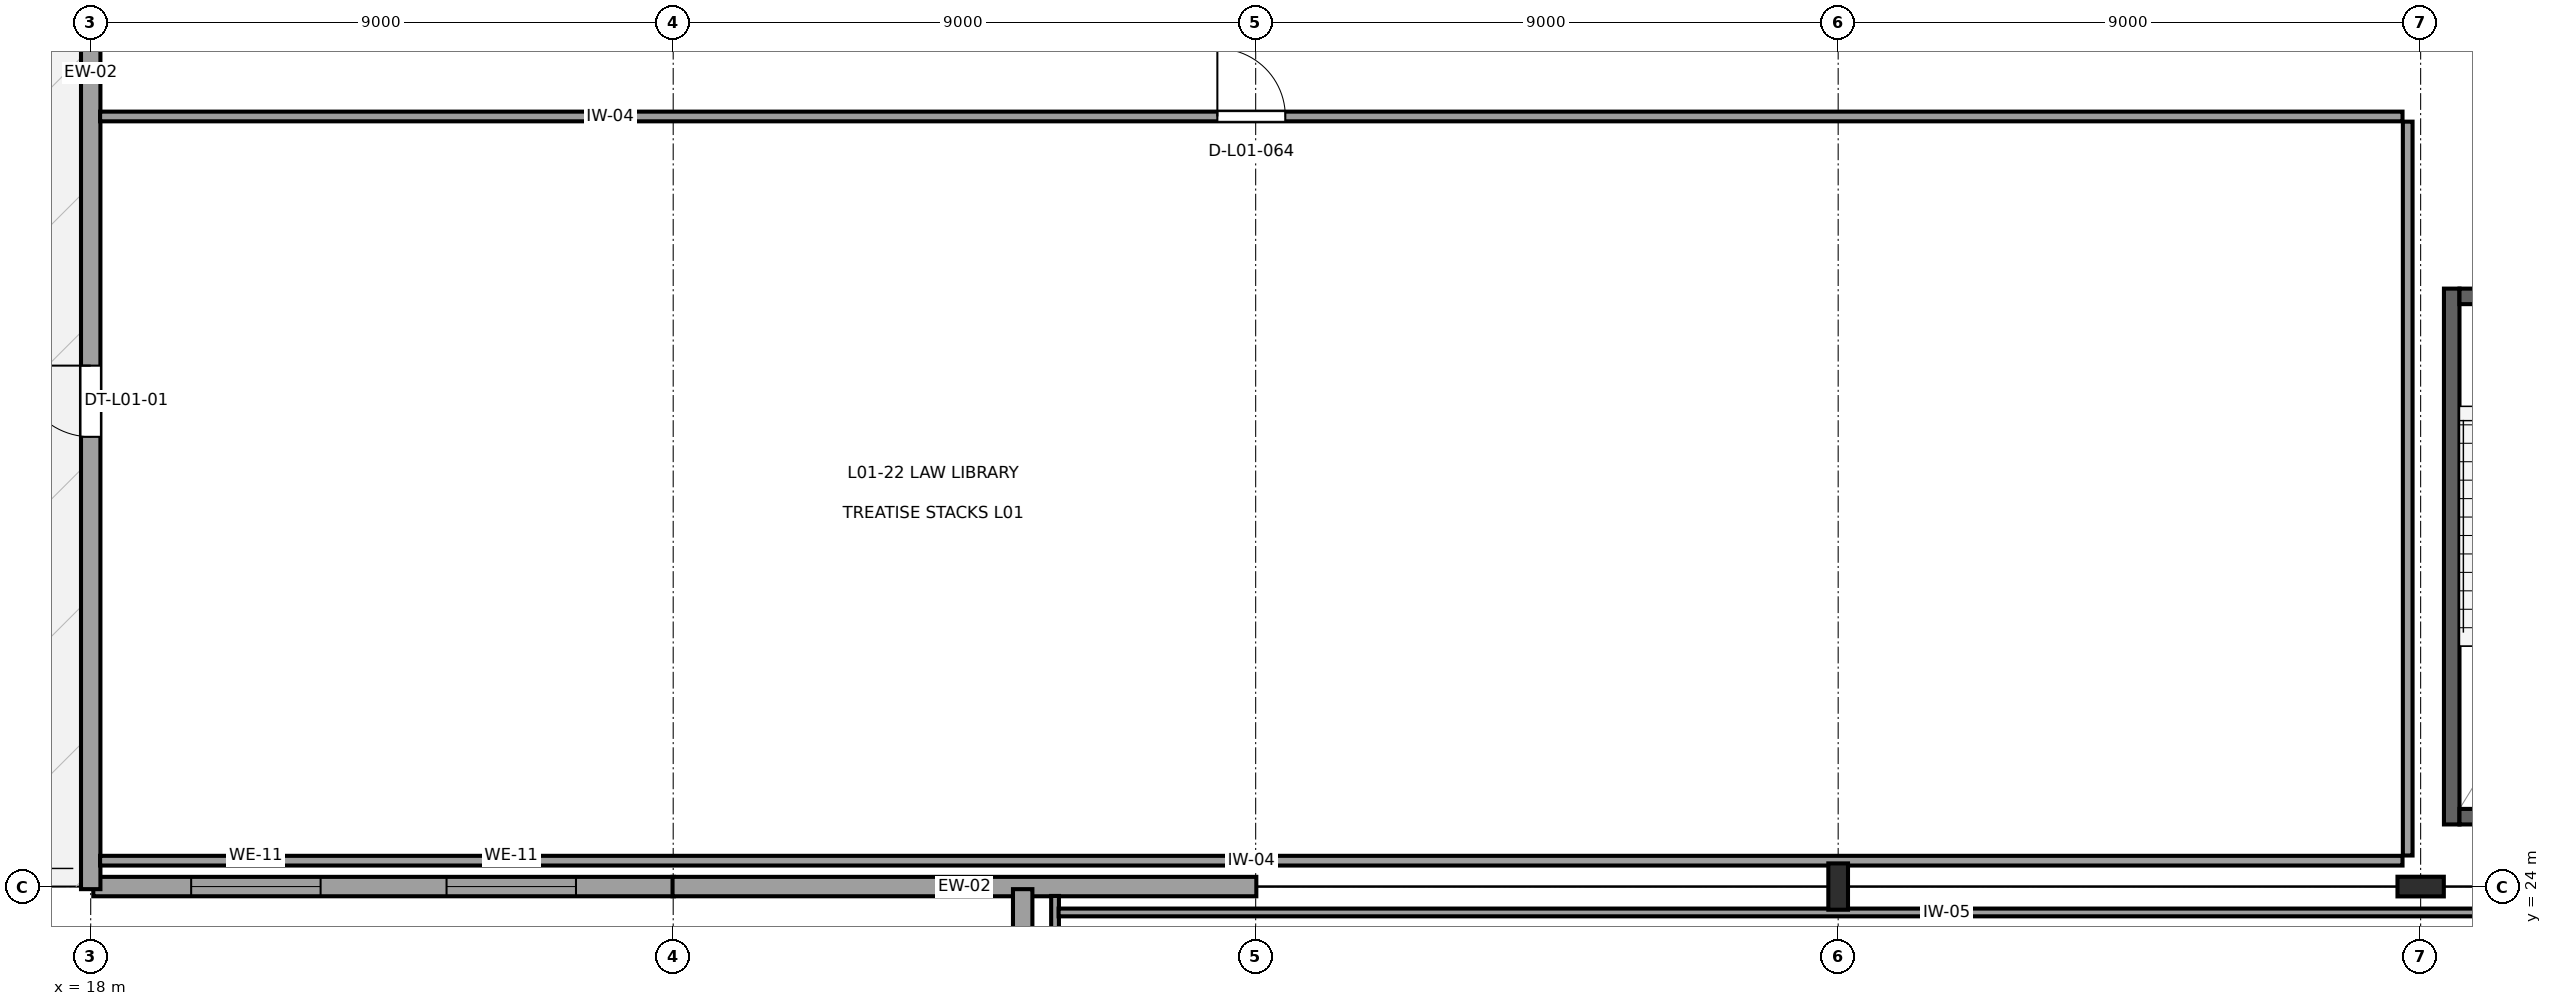
"""IFC4 building model, lengths in metres.
Left out: names, types, materials, properties, quantities, classifications, styles, units other than length and angle.
Written with IfcOpenShell. Run it as: python <this file> out.ifc"""

import sys

from ifc_helpers import new_model, si_unit, direction, frame, frame_2d, origin, origin_2d, place, context, subcontext, project, spatial, rectangle, i_section, extrude, element, fill, save


model = new_model("IFC4")
c1 = context("Model", 3, precision=1e-05, world=origin(), true_north=direction((0.0, 1.0)))
c2 = subcontext(c1, "Body", "Model", "MODEL_VIEW")
j1 = project(units=[si_unit("LENGTHUNIT", "METRE"), si_unit("PLANEANGLEUNIT", "RADIAN")], contexts=[c1])
p1 = place(None, origin())
s1 = spatial("IfcSite", under=j1, at=p1, CompositionType="ELEMENT")
p2 = place(p1, origin())
s2 = spatial("IfcBuilding", under=s1, at=p2, CompositionType="ELEMENT")
p3 = place(p2, frame((0.0, 0.0, 5.4)))
s3 = spatial("IfcBuildingStorey", under=s2, at=p3, CompositionType="ELEMENT", Elevation=5.4)
for number, where, z_axis, x_axis in (
    (1, (45.0, 24.0, 0.0), (0.0, 0.0, 1.0), (1.0, 0.0, 0.0)),
    (2, (54.0, 24.0, 0.0), (0.0, 0.0, 1.0), (0.0, 1.0, 0.0)),
):
    element("IfcColumn", number, at=place(p3, frame(where, z_axis=z_axis, x_axis=x_axis)), inside=s3, PredefinedType="COLUMN", context=c2, shape_type="SweptSolid", body=[
        extrude(i_section(OverallWidth=0.304, OverallDepth=0.716, WebThickness=0.021, FlangeThickness=0.04, at=origin_2d()), origin(), (0.0, 0.0, 1.0), 4.5),
    ])
p4 = place(p3, frame((18.04, 24.0, 0.0), z_axis=(0.0, 0.0, 1.0), x_axis=(1.0, 0.0, 0.0)))
e3 = element("IfcWall", 3, at=p4, inside=s3, PredefinedType="SOLIDWALL", context=c2, shape_type="SweptSolid", body=[
    extrude(rectangle(XDim=8.97, YDim=0.3, at=frame_2d((4.485, 0.0))), origin(), (0.0, 0.0, 1.0), 4.18),
])
p5 = place(p4, frame((1.512, 0.0, 0.85)))
e4 = element("IfcOpeningElement", 4, at=p5, cuts=e3, PredefinedType="OPENING", context=c2, shape_type="SweptSolid", body=[
    extrude(rectangle(XDim=2.0, YDim=2.0, at=frame_2d((1.0, 1.0))), frame((0.0, 0.165, 0.0), z_axis=(0.0, -1.0, 0.0), x_axis=(1.0, 0.0, 0.0)), (0.0, 0.0, 1.0), 0.33),
])
p6 = place(p4, frame((5.458, 0.0, 0.85)))
e5 = element("IfcOpeningElement", 5, at=p6, cuts=e3, PredefinedType="OPENING", context=c2, shape_type="SweptSolid", body=[
    extrude(rectangle(XDim=2.0, YDim=2.0, at=frame_2d((1.0, 1.0))), frame((0.0, 0.165, 0.0), z_axis=(0.0, -1.0, 0.0), x_axis=(1.0, 0.0, 0.0)), (0.0, 0.0, 1.0), 0.33),
])
p7 = place(p3, frame((26.99, 24.0, 0.0), z_axis=(0.0, 0.0, 1.0), x_axis=(1.0, 0.0, 0.0)))
e6 = element("IfcWall", 6, at=p7, inside=s3, PredefinedType="SOLIDWALL", context=c2, shape_type="SweptSolid", body=[
    extrude(rectangle(XDim=9.02, YDim=0.3, at=frame_2d((4.51, 0.0))), origin(), (0.0, 0.0, 1.0), 3.147),
])
p8 = place(p3, frame((18.0, 41.727, 0.0), z_axis=(0.0, 0.0, 1.0), x_axis=(0.0, -1.0, 0.0)))
e7 = element("IfcWall", 7, at=p8, inside=s3, PredefinedType="SOLIDWALL", context=c2, shape_type="SweptSolid", body=[
    extrude(rectangle(XDim=17.767, YDim=0.3, at=frame_2d((8.884, 0.0))), origin(), (0.0, 0.0, 1.0), 4.18),
])
p9 = place(p8, frame((9.677, 0.0, 0.0)))
e8 = element("IfcOpeningElement", 8, at=p9, cuts=e7, PredefinedType="OPENING", context=c2, shape_type="SweptSolid", body=[
    extrude(rectangle(XDim=1.1, YDim=2.2, at=frame_2d((0.55, 1.1))), frame((0.0, 0.165, 0.0), z_axis=(0.0, -1.0, 0.0), x_axis=(1.0, 0.0, 0.0)), (0.0, 0.0, 1.0), 0.33),
])
p10 = place(p3, frame((32.4, 23.96, 0.0), z_axis=(0.0, 0.0, 1.0), x_axis=(0.0, -1.0, 0.0)))
e9 = element("IfcWall", 9, at=p10, inside=s3, PredefinedType="SOLIDWALL", context=c2, shape_type="SweptSolid", body=[
    extrude(rectangle(XDim=11.97, YDim=0.3, at=frame_2d((5.985, 0.0))), origin(), (0.0, 0.0, 1.0), 3.455),
])
p11 = place(p10, frame((2.941, 0.0, 0.9)))
e10 = element("IfcOpeningElement", 10, at=p11, cuts=e9, PredefinedType="OPENING", context=c2, shape_type="SweptSolid", body=[
    extrude(rectangle(XDim=1.3, YDim=1.3, at=frame_2d((0.65, 0.65))), frame((0.0, 0.165, 0.0), z_axis=(0.0, -1.0, 0.0), x_axis=(1.0, 0.0, 0.0)), (0.0, 0.0, 1.0), 0.33),
])
p12 = place(p10, frame((8.5, 0.0, 0.9)))
e11 = element("IfcOpeningElement", 11, at=p12, cuts=e9, PredefinedType="OPENING", context=c2, shape_type="SweptSolid", body=[
    extrude(rectangle(XDim=1.3, YDim=1.3, at=frame_2d((0.65, 0.65))), frame((0.0, 0.165, 0.0), z_axis=(0.0, -1.0, 0.0), x_axis=(1.0, 0.0, 0.0)), (0.0, 0.0, 1.0), 0.33),
])
p13 = place(p3, frame((54.48, 24.96, 0.0), z_axis=(0.0, 0.0, 1.0), x_axis=(0.0, 1.0, 0.0)))
e12 = element("IfcWall", 12, at=p13, inside=s3, PredefinedType="SHEAR", context=c2, shape_type="SweptSolid", body=[
    extrude(rectangle(XDim=8.28, YDim=0.24, at=frame_2d((4.14, 0.0))), origin(), (0.0, 0.0, 1.0), 4.31),
])
for number, where, z_axis, x_axis in (
    (13, (54.6, 25.08, 0.0), (0.0, 0.0, 1.0), (1.0, 0.0, 0.0)),
    (14, (54.6, 33.12, 0.0), (0.0, 0.0, 1.0), (1.0, 0.0, 0.0)),
):
    element("IfcWall", number, at=place(p3, frame(where, z_axis=z_axis, x_axis=x_axis)), inside=s3, PredefinedType="SHEAR", context=c2, shape_type="SweptSolid", body=[
        extrude(rectangle(XDim=3.7, YDim=0.24, at=frame_2d((1.85, 0.0))), origin(), (0.0, 0.0, 1.0), 4.31),
    ])
p14 = place(p3, frame((53.72, 24.4, 0.0), z_axis=(0.0, 0.0, 1.0), x_axis=(-1.0, 0.0, 0.0)))
e15 = element("IfcWall", 15, at=p14, inside=s3, PredefinedType="PARTITIONING", context=c2, shape_type="SweptSolid", body=[
    extrude(rectangle(XDim=35.575, YDim=0.15, at=frame_2d((17.788, 0.0))), origin(), (0.0, 0.0, 1.0), 4.14),
])
p15 = place(p3, frame((18.145, 35.9, 0.0), z_axis=(0.0, 0.0, 1.0), x_axis=(1.0, 0.0, 0.0)))
e16 = element("IfcWall", 16, at=p15, inside=s3, PredefinedType="PARTITIONING", context=c2, shape_type="SweptSolid", body=[
    extrude(rectangle(XDim=35.575, YDim=0.15, at=frame_2d((17.788, 0.0))), origin(), (0.0, 0.0, 1.0), 4.14),
])
p16 = place(p15, frame((17.263, 0.0, 0.0)))
e17 = element("IfcOpeningElement", 17, at=p16, cuts=e16, PredefinedType="OPENING", context=c2, shape_type="SweptSolid", body=[
    extrude(rectangle(XDim=1.05, YDim=2.25, at=frame_2d((0.525, 1.125))), frame((0.0, 0.09, 0.0), z_axis=(0.0, -1.0, 0.0), x_axis=(1.0, 0.0, 0.0)), (0.0, 0.0, 1.0), 0.18),
])
p17 = place(p3, frame((53.8, 35.82, 0.0), z_axis=(0.0, 0.0, 1.0), x_axis=(0.0, -1.0, 0.0)))
e18 = element("IfcWall", 18, at=p17, inside=s3, PredefinedType="PARTITIONING", context=c2, shape_type="SweptSolid", body=[
    extrude(rectangle(XDim=11.34, YDim=0.15, at=frame_2d((5.67, 0.0))), origin(), (0.0, 0.0, 1.0), 3.365),
])
p18 = place(p3, frame((32.9, 19.18, 0.0), z_axis=(0.0, 0.0, 1.0), x_axis=(0.0, 1.0, 0.0)))
e19 = element("IfcWall", 19, at=p18, inside=s3, PredefinedType="PARTITIONING", context=c2, shape_type="SweptSolid", body=[
    extrude(rectangle(XDim=4.675, YDim=0.12, at=frame_2d((2.337, 0.0))), origin(), (0.0, 0.0, 1.0), 4.14),
])
p19 = place(p3, frame((32.955, 23.6, 0.0), z_axis=(0.0, 0.0, 1.0), x_axis=(1.0, 0.0, 0.0)))
e20 = element("IfcWall", 20, at=p19, inside=s3, PredefinedType="PARTITIONING", context=c2, shape_type="SweptSolid", body=[
    extrude(rectangle(XDim=38.965, YDim=0.12, at=frame_2d((19.482, 0.0))), origin(), (0.0, 0.0, 1.0), 4.14),
])
p20 = place(p9, frame((1.1, 0.0, 0.0), z_axis=(0.0, 0.0, 1.0), x_axis=(-1.0, 0.0, 0.0)))
e21 = element("IfcDoor", 21, at=p20, inside=s3, OperationType="SINGLE_SWING_LEFT", PredefinedType="DOOR", context=c2, shape_type="SweptSolid", body=[
    extrude(rectangle(XDim=1.1, YDim=2.2, at=frame_2d((0.55, 1.1))), frame((0.0, 0.025, 0.0), z_axis=(0.0, -1.0, 0.0), x_axis=(1.0, 0.0, 0.0)), (0.0, 0.0, 1.0), 0.05),
])
fill(e8, e21)
p21 = place(p5, origin())
e22 = element("IfcWindow", 22, at=p21, inside=s3, PartitioningType="SINGLE_PANEL", PredefinedType="WINDOW", context=c2, shape_type="SweptSolid", body=[
    extrude(rectangle(XDim=2.0, YDim=2.0, at=frame_2d((1.0, 1.0))), frame((0.0, 0.03, 0.0), z_axis=(0.0, -1.0, 0.0), x_axis=(1.0, 0.0, 0.0)), (0.0, 0.0, 1.0), 0.06),
])
fill(e4, e22)
p22 = place(p6, origin())
e23 = element("IfcWindow", 23, at=p22, inside=s3, PartitioningType="SINGLE_PANEL", PredefinedType="WINDOW", context=c2, shape_type="SweptSolid", body=[
    extrude(rectangle(XDim=2.0, YDim=2.0, at=frame_2d((1.0, 1.0))), frame((0.0, 0.03, 0.0), z_axis=(0.0, -1.0, 0.0), x_axis=(1.0, 0.0, 0.0)), (0.0, 0.0, 1.0), 0.06),
])
fill(e5, e23)
p23 = place(p16, origin())
e24 = element("IfcDoor", 24, at=p23, inside=s3, OperationType="SINGLE_SWING_LEFT", PredefinedType="DOOR", context=c2, shape_type="SweptSolid", body=[
    extrude(rectangle(XDim=1.05, YDim=2.25, at=frame_2d((0.525, 1.125))), frame((0.0, 0.025, 0.0), z_axis=(0.0, -1.0, 0.0), x_axis=(1.0, 0.0, 0.0)), (0.0, 0.0, 1.0), 0.05),
])
fill(e17, e24)
save(model, sys.argv[1])
